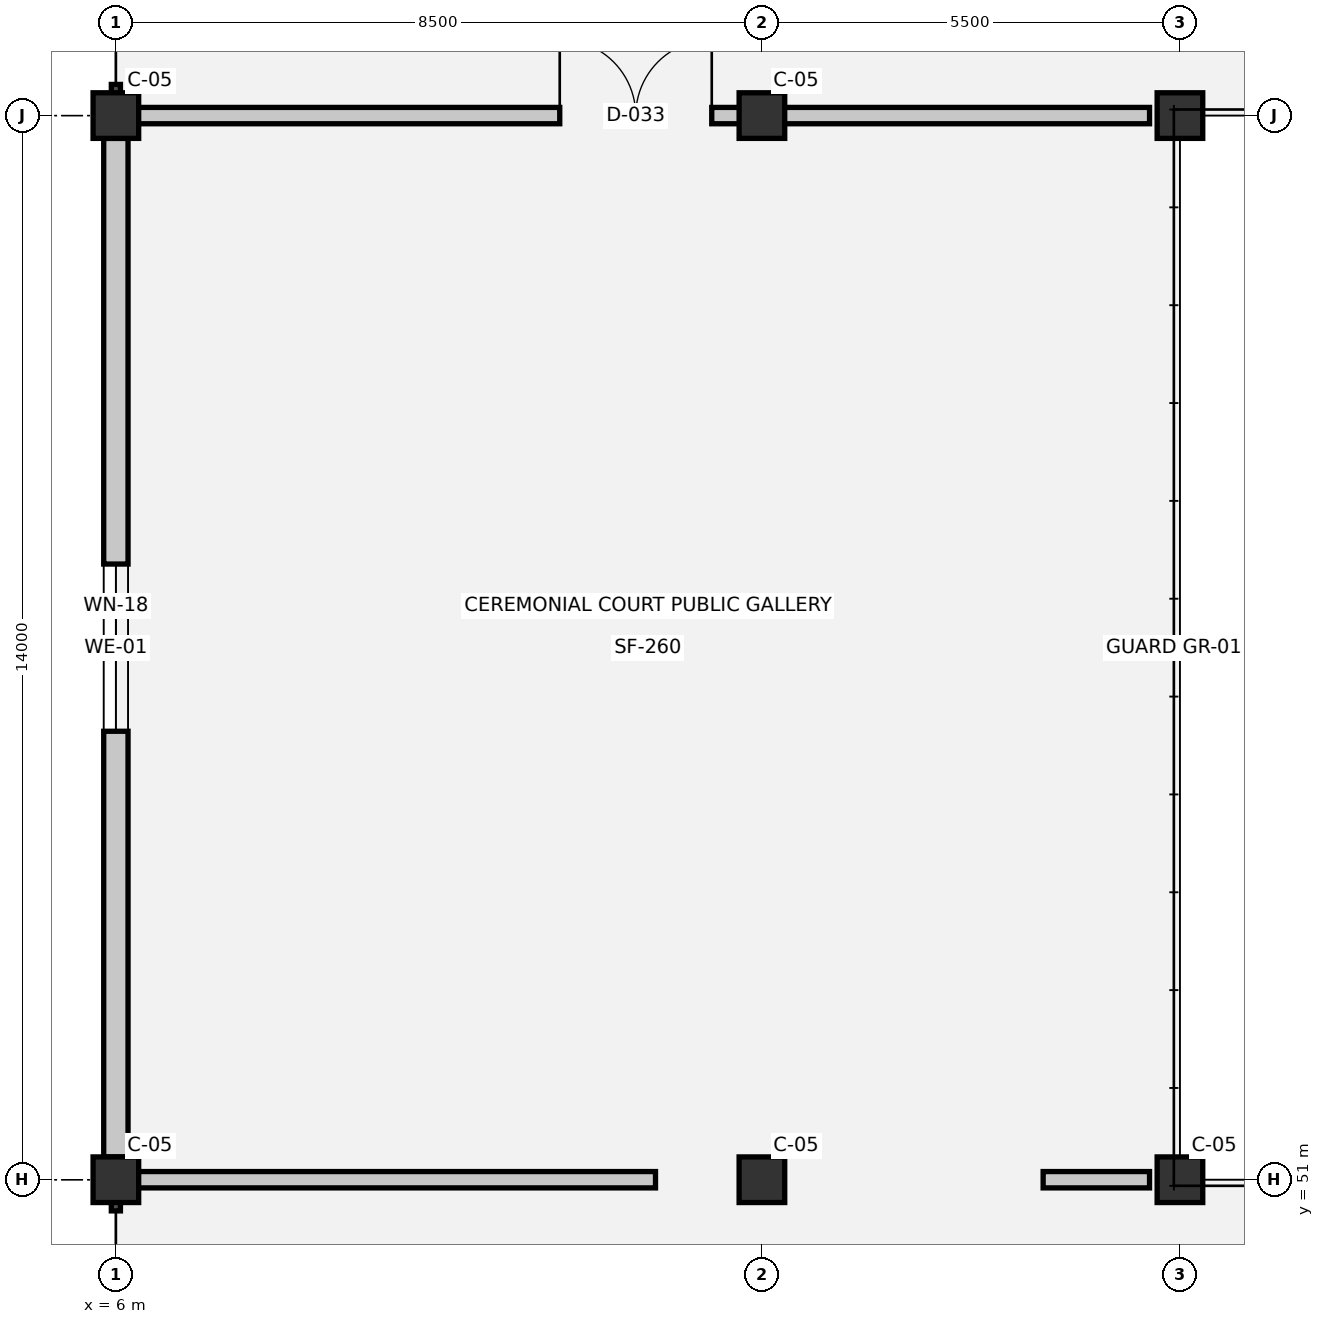
"""IFC4 building model, lengths in metres.
Left out: names, types, materials, properties, quantities, classifications, styles, units other than length and angle.
Written with IfcOpenShell. Run it as: python <this file> out.ifc"""

import sys

from ifc_helpers import new_model, si_unit, direction, frame, frame_2d, origin, origin_2d, place, context, subcontext, project, spatial, rectangle, extrude, element, fill, save


model = new_model("IFC4")
c1 = context("Model", 3, precision=1e-05, world=origin(), true_north=direction((0.0, 1.0)))
c2 = subcontext(c1, "Body", "Model", "MODEL_VIEW")
j1 = project(units=[si_unit("LENGTHUNIT", "METRE"), si_unit("PLANEANGLEUNIT", "RADIAN")], contexts=[c1])
p1 = place(None, origin())
s1 = spatial("IfcSite", under=j1, at=p1, CompositionType="ELEMENT")
p2 = place(p1, origin())
s2 = spatial("IfcBuilding", under=s1, at=p2, CompositionType="ELEMENT")
p3 = place(p2, frame((0.0, 0.0, 9.9)))
s3 = spatial("IfcBuildingStorey", under=s2, at=p3, CompositionType="ELEMENT", Elevation=9.9)
for number, where, z_axis, x_axis in (
    (1, (6.0, 51.0, 0.0), (0.0, 0.0, 1.0), (1.0, 0.0, 0.0)),
    (2, (6.0, 65.0, 0.0), (0.0, 0.0, 1.0), (1.0, 0.0, 0.0)),
    (3, (14.5, 51.0, 0.0), (0.0, 0.0, 1.0), (1.0, 0.0, 0.0)),
    (4, (14.5, 65.0, 0.0), (0.0, 0.0, 1.0), (1.0, 0.0, 0.0)),
    (5, (20.0, 51.0, 0.0), (0.0, 0.0, 1.0), (1.0, 0.0, 0.0)),
    (6, (20.0, 65.0, 0.0), (0.0, 0.0, 1.0), (1.0, 0.0, 0.0)),
):
    element("IfcColumn", number, at=place(p3, frame(where, z_axis=z_axis, x_axis=x_axis)), inside=s3, PredefinedType="COLUMN", context=c2, shape_type="SweptSolid", body=[
        extrude(rectangle(XDim=0.6, YDim=0.6, at=origin_2d()), origin(), (0.0, 0.0, 1.0), 4.5),
    ])
p4 = place(p3, frame((6.0, 51.3, 0.0), z_axis=(0.0, 0.0, 1.0), x_axis=(0.0, 1.0, 0.0)))
e7 = element("IfcWall", 7, at=p4, inside=s3, PredefinedType="SOLIDWALL", context=c2, shape_type="SweptSolid", body=[
    extrude(rectangle(XDim=13.4, YDim=0.32, at=frame_2d((6.7, 0.0))), origin(), (0.0, 0.0, 1.0), 3.11),
])
p5 = place(p4, frame((5.6, 0.0, 0.9)))
e8 = element("IfcOpeningElement", 8, at=p5, cuts=e7, PredefinedType="OPENING", context=c2, shape_type="SweptSolid", body=[
    extrude(rectangle(XDim=2.2, YDim=1.0, at=frame_2d((1.1, 0.5))), frame((0.0, 0.17, 0.0), z_axis=(0.0, -1.0, 0.0), x_axis=(1.0, 0.0, 0.0)), (0.0, 0.0, 1.0), 0.34),
])
p6 = place(p3, frame((6.08, 51.0, 0.0), z_axis=(0.0, 0.0, 1.0), x_axis=(1.0, 0.0, 0.0)))
e9 = element("IfcWall", 9, at=p6, inside=s3, PredefinedType="PARTITIONING", context=c2, shape_type="SweptSolid", body=[
    extrude(rectangle(XDim=7.02, YDim=0.215, at=frame_2d((3.51, 0.0))), origin(), (0.0, 0.0, 1.0), 3.53),
])
p7 = place(p3, frame((18.2, 51.0, 0.0), z_axis=(0.0, 0.0, 1.0), x_axis=(1.0, 0.0, 0.0)))
e10 = element("IfcWall", 10, at=p7, inside=s3, PredefinedType="PARTITIONING", context=c2, shape_type="SweptSolid", body=[
    extrude(rectangle(XDim=1.4, YDim=0.215, at=frame_2d((0.7, 0.0))), origin(), (0.0, 0.0, 1.0), 3.53),
])
p8 = place(p3, frame((6.08, 65.0, 0.0), z_axis=(0.0, 0.0, 1.0), x_axis=(1.0, 0.0, 0.0)))
e11 = element("IfcWall", 11, at=p8, inside=s3, PredefinedType="PARTITIONING", context=c2, shape_type="SweptSolid", body=[
    extrude(rectangle(XDim=13.52, YDim=0.215, at=frame_2d((6.76, 0.0))), origin(), (0.0, 0.0, 1.0), 3.53),
])
p9 = place(p8, frame((5.76, 0.0, 0.0)))
e12 = element("IfcOpeningElement", 12, at=p9, cuts=e11, PredefinedType="OPENING", context=c2, shape_type="SweptSolid", body=[
    extrude(rectangle(XDim=2.0, YDim=2.35, at=frame_2d((1.0, 1.175))), frame((0.0, 0.117, 0.0), z_axis=(0.0, -1.0, 0.0), x_axis=(1.0, 0.0, 0.0)), (0.0, 0.0, 1.0), 0.235),
])
p10 = place(p5, origin())
e13 = element("IfcWindow", 13, at=p10, inside=s3, PartitioningType="SINGLE_PANEL", PredefinedType="WINDOW", context=c2, shape_type="SweptSolid", body=[
    extrude(rectangle(XDim=2.2, YDim=1.0, at=frame_2d((1.1, 0.5))), frame((0.0, 0.03, 0.0), z_axis=(0.0, -1.0, 0.0), x_axis=(1.0, 0.0, 0.0)), (0.0, 0.0, 1.0), 0.06),
])
fill(e8, e13)
p11 = place(p9, origin())
e14 = element("IfcDoor", 14, at=p11, inside=s3, OperationType="DOUBLE_DOOR_SINGLE_SWING", PredefinedType="DOOR", context=c2, shape_type="SweptSolid", body=[
    extrude(rectangle(XDim=2.0, YDim=2.35, at=frame_2d((1.0, 1.175))), frame((0.0, 0.025, 0.0), z_axis=(0.0, -1.0, 0.0), x_axis=(1.0, 0.0, 0.0)), (0.0, 0.0, 1.0), 0.05),
])
fill(e12, e14)
save(model, sys.argv[1])
